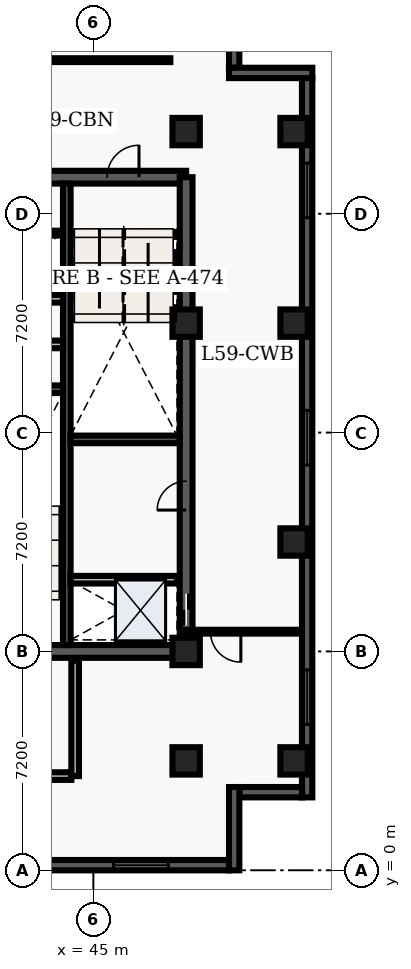
"""IFC4 building model, lengths in metres.
Left out: names, types, materials, properties, quantities, classifications, styles, units other than length and angle.
Written with IfcOpenShell. Run it as: python <this file> out.ifc"""

import sys

from ifc_helpers import new_model, entity, si_unit, converted_unit, direction, frame, origin_with_axes, origin_2d_with_axis, place, context, subcontext, project, spatial, polyline, rectangle, outline, extrude, element, fill, save


model = new_model("IFC4")
c1 = context("Model", 3, precision=1e-05, world=origin_with_axes(), true_north=direction((0.0, 1.0)))
c2 = subcontext(c1, "Body", "Model", "MODEL_VIEW")
j1 = project(units=[si_unit("LENGTHUNIT", "METRE"), converted_unit("PLANEANGLEUNIT", "DEGREE", entity("IfcPlaneAngleMeasure", 0.017), si_unit("PLANEANGLEUNIT", "RADIAN"), dimensions=[0, 0, 0, 0, 0, 0, 0])], contexts=[c1])
p1 = place(None, origin_with_axes())
s1 = spatial("IfcSite", under=j1, at=p1, CompositionType="ELEMENT")
p2 = place(p1, origin_with_axes())
s2 = spatial("IfcBuilding", under=s1, at=p2, CompositionType="ELEMENT")
p3 = place(p2, frame((0.0, 0.0, 240.3), z_axis=(0.0, 0.0, 1.0), x_axis=(1.0, 0.0, 0.0)))
s3 = spatial("IfcBuildingStorey", under=s2, at=p3, CompositionType="ELEMENT", Elevation=240.3)
p4 = place(p3, frame((40.2, 7.2, 0.0), z_axis=(0.0, 0.0, 1.0), x_axis=(1.0, 0.0, 0.0)))
e1 = element("IfcWall", 1, at=p4, inside=s3, PredefinedType="SHEAR", context=c2, shape_type="SweptSolid", body=[
    extrude(outline(polyline([(0.0, -0.21), (7.85, -0.21), (7.85, 0.21), (0.0, 0.21), (0.0, -0.21)])), origin_with_axes(), (0.0, 0.0, 1.0), 3.66),
])
p5 = place(p4, frame((2.175, 0.0, 0.0), z_axis=(0.0, 0.0, 1.0), x_axis=(1.0, 0.0, 0.0)))
e2 = element("IfcOpeningElement", 2, at=p5, cuts=e1, PredefinedType="OPENING", context=c2, shape_type="SweptSolid", body=[
    extrude(rectangle(XDim=1.05, YDim=0.44, at=origin_2d_with_axis()), origin_with_axes(), (0.0, 0.0, 1.0), 2.15),
])
p6 = place(p3, frame((40.2, 22.8, 0.0), z_axis=(0.0, 0.0, 1.0), x_axis=(1.0, 0.0, 0.0)))
e3 = element("IfcWall", 3, at=p6, inside=s3, PredefinedType="SHEAR", context=c2, shape_type="SweptSolid", body=[
    extrude(outline(polyline([(0.0, -0.21), (7.85, -0.21), (7.85, 0.21), (0.0, 0.21), (0.0, -0.21)])), origin_with_axes(), (0.0, 0.0, 1.0), 3.66),
])
p7 = place(p6, frame((5.775, 0.0, 0.0), z_axis=(0.0, 0.0, 1.0), x_axis=(1.0, 0.0, 0.0)))
e4 = element("IfcOpeningElement", 4, at=p7, cuts=e3, PredefinedType="OPENING", context=c2, shape_type="SweptSolid", body=[
    extrude(rectangle(XDim=1.05, YDim=0.44, at=origin_2d_with_axis()), origin_with_axes(), (0.0, 0.0, 1.0), 2.15),
])
p8 = place(p6, frame((2.15, 0.0, 0.0), z_axis=(0.0, 0.0, 1.0), x_axis=(1.0, 0.0, 0.0)))
e5 = element("IfcOpeningElement", 5, at=p8, cuts=e3, PredefinedType="OPENING", context=c2, shape_type="SweptSolid", body=[
    extrude(rectangle(XDim=0.9, YDim=0.44, at=origin_2d_with_axis()), origin_with_axes(), (0.0, 0.0, 1.0), 2.15),
])
p9 = place(p3, frame((48.05, 7.2, 0.0), z_axis=(0.0, 0.0, 1.0), x_axis=(0.0, 1.0, 0.0)))
e6 = element("IfcWall", 6, at=p9, inside=s3, PredefinedType="SHEAR", context=c2, shape_type="SweptSolid", body=[
    extrude(outline(polyline([(0.0, -0.21), (15.6, -0.21), (15.6, 0.21), (0.0, 0.21), (0.0, -0.21)])), origin_with_axes(), (0.0, 0.0, 1.0), 3.66),
])
p10 = place(p9, frame((1.375, 0.0, 0.0), z_axis=(0.0, 0.0, 1.0), x_axis=(1.0, 0.0, 0.0)))
e7 = element("IfcOpeningElement", 7, at=p10, cuts=e6, PredefinedType="OPENING", context=c2, shape_type="SweptSolid", body=[
    extrude(rectangle(XDim=1.05, YDim=0.44, at=origin_2d_with_axis()), origin_with_axes(), (0.0, 0.0, 1.0), 2.15),
])
p11 = place(p9, frame((5.125, 0.0, 0.0), z_axis=(0.0, 0.0, 1.0), x_axis=(1.0, 0.0, 0.0)))
e8 = element("IfcOpeningElement", 8, at=p11, cuts=e6, PredefinedType="OPENING", context=c2, shape_type="SweptSolid", body=[
    extrude(rectangle(XDim=0.95, YDim=0.44, at=origin_2d_with_axis()), origin_with_axes(), (0.0, 0.0, 1.0), 2.15),
])
p12 = place(p3, frame((44.125, 7.41, 0.0), z_axis=(0.0, 0.0, 1.0), x_axis=(0.0, 1.0, 0.0)))
e9 = element("IfcWall", 9, at=p12, inside=s3, PredefinedType="SHEAR", context=c2, shape_type="SweptSolid", body=[
    extrude(outline(polyline([(0.0, -0.125), (15.18, -0.125), (15.18, 0.125), (0.0, 0.125), (0.0, -0.125)])), origin_with_axes(), (0.0, 0.0, 1.0), 3.66),
])
for number, where, z_axis, x_axis in (
    (10, (40.41, 15.825, 0.0), (0.0, 0.0, 1.0), (1.0, 0.0, 0.0)),
    (11, (44.25, 14.175, 0.0), (0.0, 0.0, 1.0), (1.0, 0.0, 0.0)),
):
    element("IfcWall", number, at=place(p3, frame(where, z_axis=z_axis, x_axis=x_axis)), inside=s3, PredefinedType="SHEAR", context=c2, shape_type="SweptSolid", body=[
        extrude(outline(polyline([(0.0, -0.125), (3.59, -0.125), (3.59, 0.125), (0.0, 0.125), (0.0, -0.125)])), origin_with_axes(), (0.0, 0.0, 1.0), 3.66),
    ])
p13 = place(p3, frame((40.5, 17.3, 0.0), z_axis=(0.0, 0.0, 1.0), x_axis=(1.0, 0.0, 0.0)))
e12 = element("IfcWall", 12, at=p13, inside=s3, PredefinedType="SOLIDWALL", context=c2, shape_type="SweptSolid", body=[
    extrude(outline(polyline([(0.0, -0.125), (3.5, -0.125), (3.5, 0.125), (0.0, 0.125), (0.0, -0.125)])), origin_with_axes(), (0.0, 0.0, 1.0), 2.7),
])
p14 = place(p13, frame((2.4, 0.0, 0.0), z_axis=(0.0, 0.0, 1.0), x_axis=(1.0, 0.0, 0.0)))
e13 = element("IfcOpeningElement", 13, at=p14, cuts=e12, PredefinedType="OPENING", context=c2, shape_type="SweptSolid", body=[
    extrude(rectangle(XDim=0.9, YDim=0.27, at=origin_2d_with_axis()), origin_with_axes(), (0.0, 0.0, 1.0), 2.15),
])
p15 = place(p3, frame((40.5, 18.8, 0.0), z_axis=(0.0, 0.0, 1.0), x_axis=(1.0, 0.0, 0.0)))
e14 = element("IfcWall", 14, at=p15, inside=s3, PredefinedType="SOLIDWALL", context=c2, shape_type="SweptSolid", body=[
    extrude(outline(polyline([(0.0, -0.125), (3.5, -0.125), (3.5, 0.125), (0.0, 0.125), (0.0, -0.125)])), origin_with_axes(), (0.0, 0.0, 1.0), 2.7),
])
p16 = place(p3, frame((40.325, 3.1, 0.0), z_axis=(0.0, 0.0, 1.0), x_axis=(1.0, 0.0, 0.0)))
e15 = element("IfcWall", 15, at=p16, inside=s3, PredefinedType="SOLIDWALL", context=c2, shape_type="SweptSolid", body=[
    extrude(outline(polyline([(0.0, -0.125), (3.95, -0.125), (3.95, 0.125), (0.0, 0.125), (0.0, -0.125)])), origin_with_axes(), (0.0, 0.0, 1.0), 2.7),
])
p17 = place(p3, frame((44.4, 3.1, 0.0), z_axis=(0.0, 0.0, 1.0), x_axis=(0.0, 1.0, 0.0)))
e16 = element("IfcWall", 16, at=p17, inside=s3, PredefinedType="SOLIDWALL", context=c2, shape_type="SweptSolid", body=[
    extrude(outline(polyline([(0.0, -0.125), (3.8, -0.125), (3.8, 0.125), (0.0, 0.125), (0.0, -0.125)])), origin_with_axes(), (0.0, 0.0, 1.0), 2.7),
])
for number, where, z_axis, x_axis in (
    (17, (48.05, 3.6, 0.0), (0.0, 0.0, 1.0), (1.0, 0.0, 0.0)),
    (18, (48.05, 7.2, 0.0), (0.0, 0.0, 1.0), (1.0, 0.0, 0.0)),
    (19, (48.05, 18.0, 0.0), (0.0, 0.0, 1.0), (1.0, 0.0, 0.0)),
    (20, (48.05, 24.3, 0.0), (0.0, 0.0, 1.0), (1.0, 0.0, 0.0)),
    (21, (51.6, 3.6, 0.0), (0.0, 0.0, 1.0), (1.0, 0.0, 0.0)),
    (22, (51.6, 10.8, 0.0), (0.0, 0.0, 1.0), (1.0, 0.0, 0.0)),
    (23, (51.6, 18.0, 0.0), (0.0, 0.0, 1.0), (1.0, 0.0, 0.0)),
    (24, (51.6, 24.3, 0.0), (0.0, 0.0, 1.0), (1.0, 0.0, 0.0)),
):
    element("IfcColumn", number, at=place(p3, frame(where, z_axis=z_axis, x_axis=x_axis)), inside=s3, PredefinedType="COLUMN", context=c2, shape_type="SweptSolid", body=[
        extrude(rectangle(XDim=0.9, YDim=0.9, at=origin_2d_with_axis()), origin_with_axes(), (0.0, 0.0, 1.0), 3.9),
    ])
p18 = place(p3, frame((40.5, 20.96, 0.0), z_axis=(0.0, 0.0, 1.0), x_axis=(1.0, 0.0, 0.0)))
e25 = element("IfcWall", 25, at=p18, inside=s3, PredefinedType="PARTITIONING", context=c2, shape_type="SweptSolid", body=[
    extrude(outline(polyline([(0.0, -0.08), (3.5, -0.08), (3.5, 0.08), (0.0, 0.08), (0.0, -0.08)])), origin_with_axes(), (0.0, 0.0, 1.0), 2.7),
])
p19 = place(p3, frame((44.25, 9.56, 0.0), z_axis=(0.0, 0.0, 1.0), x_axis=(1.0, 0.0, 0.0)))
e26 = element("IfcWall", 26, at=p19, inside=s3, PredefinedType="SOLIDWALL", context=c2, shape_type="SweptSolid", body=[
    extrude(outline(polyline([(0.0, -0.125), (3.5, -0.125), (3.5, 0.125), (0.0, 0.125), (0.0, -0.125)])), origin_with_axes(), (0.0, 0.0, 1.0), 2.7),
])
p20 = place(p3, frame((51.865, 7.85, 0.0), z_axis=(0.0, 0.0, 1.0), x_axis=(-1.0, 0.0, 0.0)))
e27 = element("IfcWall", 27, at=p20, inside=s3, PredefinedType="PARTITIONING", context=c2, shape_type="SweptSolid", body=[
    extrude(outline(polyline([(0.0, -0.062), (3.815, -0.062), (3.815, 0.062), (0.0, 0.062), (0.0, -0.062)])), origin_with_axes(), (0.0, 0.0, 1.0), 2.7),
])
p21 = place(p20, frame((2.515, 0.0, 0.0), z_axis=(0.0, 0.0, 1.0), x_axis=(1.0, 0.0, 0.0)))
e28 = element("IfcOpeningElement", 28, at=p21, cuts=e27, PredefinedType="OPENING", context=c2, shape_type="SweptSolid", body=[
    extrude(rectangle(XDim=1.0, YDim=0.145, at=origin_2d_with_axis()), origin_with_axes(), (0.0, 0.0, 1.0), 2.15),
])
p22 = place(p3, frame((36.335, 26.65, 0.0), z_axis=(0.0, 0.0, 1.0), x_axis=(1.0, 0.0, 0.0)))
e29 = element("IfcWall", 29, at=p22, inside=s3, PredefinedType="PARTITIONING", context=c2, shape_type="SweptSolid", body=[
    extrude(outline(polyline([(0.0, -0.062), (11.195, -0.062), (11.195, 0.062), (0.0, 0.062), (0.0, -0.062)])), origin_with_axes(), (0.0, 0.0, 1.0), 2.7),
])
p23 = place(p22, frame((6.665, 0.0, 0.0), z_axis=(0.0, 0.0, 1.0), x_axis=(1.0, 0.0, 0.0)))
e30 = element("IfcOpeningElement", 30, at=p23, cuts=e29, PredefinedType="OPENING", context=c2, shape_type="SweptSolid", body=[
    extrude(rectangle(XDim=1.0, YDim=0.145, at=origin_2d_with_axis()), origin_with_axes(), (0.0, 0.0, 1.0), 2.15),
])
p24 = place(p3, frame((49.63, 28.46, 0.0), z_axis=(0.0, 0.0, 1.0), x_axis=(0.0, -1.0, 0.0)))
e31 = element("IfcWall", 31, at=p24, inside=s3, PredefinedType="SOLIDWALL", context=c2, shape_type="SweptSolid", body=[
    extrude(outline(polyline([(0.0, -0.17), (2.06, -0.17), (2.06, 0.17), (0.0, 0.17), (0.0, -0.17)])), origin_with_axes(), (0.0, 0.0, 1.0), 3.66),
])
p25 = place(p3, frame((49.46, 26.23, 0.0), z_axis=(0.0, 0.0, 1.0), x_axis=(1.0, 0.0, 0.0)))
e32 = element("IfcWall", 32, at=p25, inside=s3, PredefinedType="SOLIDWALL", context=c2, shape_type="SweptSolid", body=[
    extrude(outline(polyline([(0.0, -0.17), (2.74, -0.17), (2.74, 0.17), (0.0, 0.17), (0.0, -0.17)])), origin_with_axes(), (0.0, 0.0, 1.0), 3.66),
])
p26 = place(p3, frame((52.03, 26.06, 0.0), z_axis=(0.0, 0.0, 1.0), x_axis=(0.0, -1.0, 0.0)))
e33 = element("IfcWall", 33, at=p26, inside=s3, PredefinedType="SOLIDWALL", context=c2, shape_type="SweptSolid", body=[
    extrude(outline(polyline([(0.0, -0.17), (23.66, -0.17), (23.66, 0.17), (0.0, 0.17), (0.0, -0.17)])), origin_with_axes(), (0.0, 0.0, 1.0), 3.66),
])
p27 = place(p26, frame((3.696, 0.0, 0.45), z_axis=(0.0, 0.0, 1.0), x_axis=(1.0, 0.0, 0.0)))
e34 = element("IfcOpeningElement", 34, at=p27, cuts=e33, PredefinedType="OPENING", context=c2, shape_type="SweptSolid", body=[
    extrude(rectangle(XDim=1.8, YDim=0.36, at=origin_2d_with_axis()), origin_with_axes(), (0.0, 0.0, 1.0), 2.1),
])
p28 = place(p26, frame((11.83, 0.0, 0.45), z_axis=(0.0, 0.0, 1.0), x_axis=(1.0, 0.0, 0.0)))
e35 = element("IfcOpeningElement", 35, at=p28, cuts=e33, PredefinedType="OPENING", context=c2, shape_type="SweptSolid", body=[
    extrude(rectangle(XDim=1.8, YDim=0.36, at=origin_2d_with_axis()), origin_with_axes(), (0.0, 0.0, 1.0), 2.1),
])
p29 = place(p26, frame((20.364, 0.0, 0.45), z_axis=(0.0, 0.0, 1.0), x_axis=(1.0, 0.0, 0.0)))
e36 = element("IfcOpeningElement", 36, at=p29, cuts=e33, PredefinedType="OPENING", context=c2, shape_type="SweptSolid", body=[
    extrude(rectangle(XDim=1.8, YDim=0.36, at=origin_2d_with_axis()), origin_with_axes(), (0.0, 0.0, 1.0), 2.1),
])
p30 = place(p3, frame((51.86, 2.57, 0.0), z_axis=(0.0, 0.0, 1.0), x_axis=(-1.0, 0.0, 0.0)))
e37 = element("IfcWall", 37, at=p30, inside=s3, PredefinedType="SOLIDWALL", context=c2, shape_type="SweptSolid", body=[
    extrude(outline(polyline([(0.0, -0.17), (2.06, -0.17), (2.06, 0.17), (0.0, 0.17), (0.0, -0.17)])), origin_with_axes(), (0.0, 0.0, 1.0), 3.66),
])
p31 = place(p3, frame((49.63, 2.74, 0.0), z_axis=(0.0, 0.0, 1.0), x_axis=(0.0, -1.0, 0.0)))
e38 = element("IfcWall", 38, at=p31, inside=s3, PredefinedType="SOLIDWALL", context=c2, shape_type="SweptSolid", body=[
    extrude(outline(polyline([(0.0, -0.17), (2.74, -0.17), (2.74, 0.17), (0.0, 0.17), (0.0, -0.17)])), origin_with_axes(), (0.0, 0.0, 1.0), 3.66),
])
p32 = place(p3, frame((49.46, 0.17, 0.0), z_axis=(0.0, 0.0, 1.0), x_axis=(-1.0, 0.0, 0.0)))
e39 = element("IfcWall", 39, at=p32, inside=s3, PredefinedType="SOLIDWALL", context=c2, shape_type="SweptSolid", body=[
    extrude(outline(polyline([(0.0, -0.17), (42.56, -0.17), (42.56, 0.17), (0.0, 0.17), (0.0, -0.17)])), origin_with_axes(), (0.0, 0.0, 1.0), 3.66),
])
p33 = place(p32, frame((2.898, 0.0, 0.45), z_axis=(0.0, 0.0, 1.0), x_axis=(1.0, 0.0, 0.0)))
e40 = element("IfcOpeningElement", 40, at=p33, cuts=e39, PredefinedType="OPENING", context=c2, shape_type="SweptSolid", body=[
    extrude(rectangle(XDim=1.8, YDim=0.36, at=origin_2d_with_axis()), origin_with_axes(), (0.0, 0.0, 1.0), 2.1),
])
p34 = place(p32, frame((7.493, 0.0, 0.45), z_axis=(0.0, 0.0, 1.0), x_axis=(1.0, 0.0, 0.0)))
e41 = element("IfcOpeningElement", 41, at=p34, cuts=e39, PredefinedType="OPENING", context=c2, shape_type="SweptSolid", body=[
    extrude(rectangle(XDim=1.8, YDim=0.36, at=origin_2d_with_axis()), origin_with_axes(), (0.0, 0.0, 1.0), 2.1),
])
p35 = place(p32, frame((12.089, 0.0, 0.45), z_axis=(0.0, 0.0, 1.0), x_axis=(1.0, 0.0, 0.0)))
e42 = element("IfcOpeningElement", 42, at=p35, cuts=e39, PredefinedType="OPENING", context=c2, shape_type="SweptSolid", body=[
    extrude(rectangle(XDim=1.8, YDim=0.36, at=origin_2d_with_axis()), origin_with_axes(), (0.0, 0.0, 1.0), 2.1),
])
p36 = place(p32, frame((16.684, 0.0, 0.45), z_axis=(0.0, 0.0, 1.0), x_axis=(1.0, 0.0, 0.0)))
e43 = element("IfcOpeningElement", 43, at=p36, cuts=e39, PredefinedType="OPENING", context=c2, shape_type="SweptSolid", body=[
    extrude(rectangle(XDim=1.8, YDim=0.36, at=origin_2d_with_axis()), origin_with_axes(), (0.0, 0.0, 1.0), 2.1),
])
p37 = place(p32, frame((21.28, 0.0, 0.45), z_axis=(0.0, 0.0, 1.0), x_axis=(1.0, 0.0, 0.0)))
e44 = element("IfcOpeningElement", 44, at=p37, cuts=e39, PredefinedType="OPENING", context=c2, shape_type="SweptSolid", body=[
    extrude(rectangle(XDim=1.8, YDim=0.36, at=origin_2d_with_axis()), origin_with_axes(), (0.0, 0.0, 1.0), 2.1),
])
p38 = place(p32, frame((25.876, 0.0, 0.45), z_axis=(0.0, 0.0, 1.0), x_axis=(1.0, 0.0, 0.0)))
e45 = element("IfcOpeningElement", 45, at=p38, cuts=e39, PredefinedType="OPENING", context=c2, shape_type="SweptSolid", body=[
    extrude(rectangle(XDim=1.8, YDim=0.36, at=origin_2d_with_axis()), origin_with_axes(), (0.0, 0.0, 1.0), 2.1),
])
p39 = place(p32, frame((30.471, 0.0, 0.45), z_axis=(0.0, 0.0, 1.0), x_axis=(1.0, 0.0, 0.0)))
e46 = element("IfcOpeningElement", 46, at=p39, cuts=e39, PredefinedType="OPENING", context=c2, shape_type="SweptSolid", body=[
    extrude(rectangle(XDim=1.8, YDim=0.36, at=origin_2d_with_axis()), origin_with_axes(), (0.0, 0.0, 1.0), 2.1),
])
p40 = place(p32, frame((35.067, 0.0, 0.45), z_axis=(0.0, 0.0, 1.0), x_axis=(1.0, 0.0, 0.0)))
e47 = element("IfcOpeningElement", 47, at=p40, cuts=e39, PredefinedType="OPENING", context=c2, shape_type="SweptSolid", body=[
    extrude(rectangle(XDim=1.8, YDim=0.36, at=origin_2d_with_axis()), origin_with_axes(), (0.0, 0.0, 1.0), 2.1),
])
p41 = place(p32, frame((39.662, 0.0, 0.45), z_axis=(0.0, 0.0, 1.0), x_axis=(1.0, 0.0, 0.0)))
e48 = element("IfcOpeningElement", 48, at=p41, cuts=e39, PredefinedType="OPENING", context=c2, shape_type="SweptSolid", body=[
    extrude(rectangle(XDim=1.8, YDim=0.36, at=origin_2d_with_axis()), origin_with_axes(), (0.0, 0.0, 1.0), 2.1),
])
p42 = place(p9, frame((1.375, 0.0, 0.0), z_axis=(0.0, 0.0, 1.0), x_axis=(1.0, 0.0, 0.0)))
e49 = element("IfcDoor", 49, at=p42, inside=s3, OperationType="SLIDING_TO_LEFT", PredefinedType="DOOR", context=c2, shape_type="SweptSolid", body=[
    extrude(rectangle(XDim=1.05, YDim=0.09, at=origin_2d_with_axis()), origin_with_axes(), (0.0, 0.0, 1.0), 2.15),
])
fill(e7, e49)
p43 = place(p6, frame((5.775, 0.0, 0.0), z_axis=(0.0, 0.0, 1.0), x_axis=(1.0, 0.0, 0.0)))
e50 = element("IfcDoor", 50, at=p43, inside=s3, OperationType="SINGLE_SWING_RIGHT", PredefinedType="DOOR", context=c2, shape_type="SweptSolid", body=[
    extrude(rectangle(XDim=1.05, YDim=0.09, at=origin_2d_with_axis()), origin_with_axes(), (0.0, 0.0, 1.0), 2.15),
])
fill(e4, e50)
p44 = place(p9, frame((5.125, 0.0, 0.0), z_axis=(0.0, 0.0, 1.0), x_axis=(1.0, 0.0, 0.0)))
e51 = element("IfcDoor", 51, at=p44, inside=s3, OperationType="SINGLE_SWING_LEFT", PredefinedType="DOOR", context=c2, shape_type="SweptSolid", body=[
    extrude(rectangle(XDim=0.95, YDim=0.09, at=origin_2d_with_axis()), origin_with_axes(), (0.0, 0.0, 1.0), 2.15),
])
fill(e8, e51)
p45 = place(p20, frame((2.515, 0.0, 0.0), z_axis=(0.0, 0.0, 1.0), x_axis=(1.0, 0.0, 0.0)))
e52 = element("IfcDoor", 52, at=p45, inside=s3, OperationType="SINGLE_SWING_LEFT", PredefinedType="DOOR", context=c2, shape_type="SweptSolid", body=[
    extrude(rectangle(XDim=1.0, YDim=0.075, at=origin_2d_with_axis()), origin_with_axes(), (0.0, 0.0, 1.0), 2.15),
])
fill(e28, e52)
p46 = place(p26, frame((3.696, 0.0, 0.45), z_axis=(0.0, 0.0, 1.0), x_axis=(1.0, 0.0, 0.0)))
e53 = element("IfcWindow", 53, at=p46, inside=s3, PredefinedType="WINDOW", context=c2, shape_type="SweptSolid", body=[
    extrude(rectangle(XDim=1.8, YDim=0.09, at=origin_2d_with_axis()), origin_with_axes(), (0.0, 0.0, 1.0), 2.1),
])
fill(e34, e53)
p47 = place(p26, frame((11.83, 0.0, 0.45), z_axis=(0.0, 0.0, 1.0), x_axis=(1.0, 0.0, 0.0)))
e54 = element("IfcWindow", 54, at=p47, inside=s3, PredefinedType="WINDOW", context=c2, shape_type="SweptSolid", body=[
    extrude(rectangle(XDim=1.8, YDim=0.09, at=origin_2d_with_axis()), origin_with_axes(), (0.0, 0.0, 1.0), 2.1),
])
fill(e35, e54)
p48 = place(p26, frame((20.364, 0.0, 0.45), z_axis=(0.0, 0.0, 1.0), x_axis=(1.0, 0.0, 0.0)))
e55 = element("IfcWindow", 55, at=p48, inside=s3, PredefinedType="WINDOW", context=c2, shape_type="SweptSolid", body=[
    extrude(rectangle(XDim=1.8, YDim=0.09, at=origin_2d_with_axis()), origin_with_axes(), (0.0, 0.0, 1.0), 2.1),
])
fill(e36, e55)
p49 = place(p32, frame((2.898, 0.0, 0.45), z_axis=(0.0, 0.0, 1.0), x_axis=(1.0, 0.0, 0.0)))
e56 = element("IfcWindow", 56, at=p49, inside=s3, PredefinedType="WINDOW", context=c2, shape_type="SweptSolid", body=[
    extrude(rectangle(XDim=1.8, YDim=0.09, at=origin_2d_with_axis()), origin_with_axes(), (0.0, 0.0, 1.0), 2.1),
])
fill(e40, e56)
save(model, sys.argv[1])
